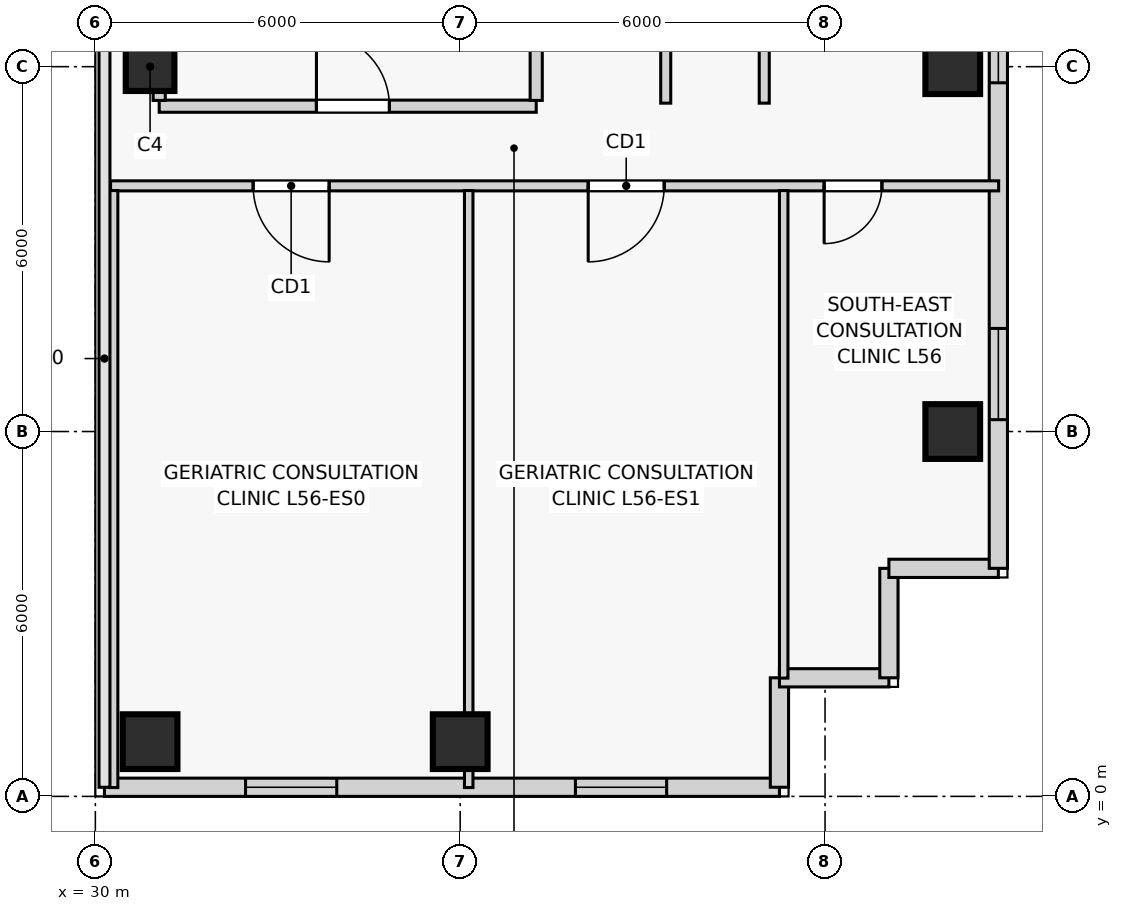
"""IFC4 building model, lengths in metres.
Left out: names, types, materials, properties, quantities, classifications, styles, units other than length and angle.
Written with IfcOpenShell. Run it as: python <this file> out.ifc"""

import sys

from ifc_helpers import new_model, si_unit, direction, frame, frame_2d, origin, origin_2d, place, context, subcontext, project, spatial, rectangle, extrude, source, transform, mapped, element, fill, save


model = new_model("IFC4")
c1 = context("Model", 3, precision=1e-05, world=origin(), true_north=direction((0.0, 1.0)))
c2 = subcontext(c1, "Body", "Model", "MODEL_VIEW")
j1 = project(units=[si_unit("LENGTHUNIT", "METRE"), si_unit("PLANEANGLEUNIT", "RADIAN")], contexts=[c1])
p1 = place(None, origin())
s1 = spatial("IfcSite", under=j1, at=p1, CompositionType="ELEMENT")
p2 = place(p1, origin())
s2 = spatial("IfcBuilding", under=s1, at=p2, CompositionType="ELEMENT")
p3 = place(p2, frame((0.0, 0.0, 213.3)))
s3 = spatial("IfcBuildingStorey", under=s2, at=p3, CompositionType="ELEMENT", Elevation=213.3)
m1 = source(origin(), c2, "Body", "SweptSolid", [
    extrude(rectangle(XDim=0.9, YDim=0.9, at=origin_2d()), origin(), (0.0, 0.0, 1.0), 3.6),
])
for number, where, z_axis, x_axis in (
    (1, (30.9, 0.9, 0.0), (0.0, 0.0, 1.0), (1.0, 0.0, 0.0)),
    (2, (36.0, 0.9, 0.0), (0.0, 0.0, 1.0), (1.0, 0.0, 0.0)),
    (3, (44.1, 6.0, 0.0), (0.0, 0.0, 1.0), (1.0, 0.0, 0.0)),
    (4, (44.1, 12.0, 0.0), (0.0, 0.0, 1.0), (1.0, 0.0, 0.0)),
):
    element("IfcColumn", number, at=place(p3, frame(where, z_axis=z_axis, x_axis=x_axis)), inside=s3, PredefinedType="COLUMN", context=c2, shape_type="MappedRepresentation", body=[
        mapped(m1, transform((0.0, 0.0, 0.0), scale=1.0)),
    ])
m2 = source(origin(), c2, "Body", "SweptSolid", [
    extrude(rectangle(XDim=0.8, YDim=0.8, at=origin_2d()), origin(), (0.0, 0.0, 1.0), 3.6),
])
p4 = place(p3, frame((30.9, 12.0, 0.0), z_axis=(0.0, 0.0, 1.0), x_axis=(1.0, 0.0, 0.0)))
e5 = element("IfcColumn", 5, at=p4, inside=s3, PredefinedType="COLUMN", context=c2, shape_type="MappedRepresentation", body=[
    mapped(m2, transform((0.0, 0.0, 0.0), scale=1.0)),
])
p5 = place(p3, frame((30.15, 0.15, 0.0), z_axis=(0.0, 0.0, 1.0), x_axis=(1.0, 0.0, 0.0)))
e6 = element("IfcWall", 6, at=p5, inside=s3, PredefinedType="SOLIDWALL", context=c2, shape_type="SweptSolid", body=[
    extrude(rectangle(XDim=11.1, YDim=0.3, at=frame_2d((5.55, 0.0))), origin(), (0.0, 0.0, 1.0), 2.95),
])
p6 = place(p5, frame((2.32, 0.0, 0.85)))
e7 = element("IfcOpeningElement", 7, at=p6, cuts=e6, PredefinedType="OPENING", context=c2, shape_type="SweptSolid", body=[
    extrude(rectangle(XDim=1.5, YDim=1.8, at=frame_2d((0.75, 0.9))), frame((0.0, 0.16, 0.0), z_axis=(0.0, -1.0, 0.0), x_axis=(1.0, 0.0, 0.0)), (0.0, 0.0, 1.0), 0.32),
])
p7 = place(p5, frame((7.745, 0.0, 0.85)))
e8 = element("IfcOpeningElement", 8, at=p7, cuts=e6, PredefinedType="OPENING", context=c2, shape_type="SweptSolid", body=[
    extrude(rectangle(XDim=1.5, YDim=1.8, at=frame_2d((0.75, 0.9))), frame((0.0, 0.16, 0.0), z_axis=(0.0, -1.0, 0.0), x_axis=(1.0, 0.0, 0.0)), (0.0, 0.0, 1.0), 0.32),
])
for number, where, z_axis, x_axis in (
    (9, (41.25, 0.15, 0.0), (0.0, 0.0, 1.0), (0.0, 1.0, 0.0)),
    (10, (41.25, 1.95, 0.0), (0.0, 0.0, 1.0), (1.0, 0.0, 0.0)),
    (11, (43.05, 1.95, 0.0), (0.0, 0.0, 1.0), (0.0, 1.0, 0.0)),
    (12, (43.05, 3.75, 0.0), (0.0, 0.0, 1.0), (1.0, 0.0, 0.0)),
):
    element("IfcWall", number, at=place(p3, frame(where, z_axis=z_axis, x_axis=x_axis)), inside=s3, PredefinedType="SOLIDWALL", context=c2, shape_type="SweptSolid", body=[
        extrude(rectangle(XDim=1.8, YDim=0.3, at=frame_2d((0.9, 0.0))), origin(), (0.0, 0.0, 1.0), 2.95),
    ])
p8 = place(p3, frame((44.85, 3.75, 0.0), z_axis=(0.0, 0.0, 1.0), x_axis=(0.0, 1.0, 0.0)))
e13 = element("IfcWall", 13, at=p8, inside=s3, PredefinedType="SOLIDWALL", context=c2, shape_type="SweptSolid", body=[
    extrude(rectangle(XDim=15.65, YDim=0.3, at=frame_2d((7.825, 0.0))), origin(), (0.0, 0.0, 1.0), 2.95),
])
p9 = place(p8, frame((2.445, 0.0, 0.85)))
e14 = element("IfcOpeningElement", 14, at=p9, cuts=e13, PredefinedType="OPENING", context=c2, shape_type="SweptSolid", body=[
    extrude(rectangle(XDim=1.5, YDim=1.8, at=frame_2d((0.75, 0.9))), frame((0.0, 0.16, 0.0), z_axis=(0.0, -1.0, 0.0), x_axis=(1.0, 0.0, 0.0)), (0.0, 0.0, 1.0), 0.32),
])
p10 = place(p8, frame((7.985, 0.0, 0.85)))
e15 = element("IfcOpeningElement", 15, at=p10, cuts=e13, PredefinedType="OPENING", context=c2, shape_type="SweptSolid", body=[
    extrude(rectangle(XDim=1.5, YDim=1.8, at=frame_2d((0.75, 0.9))), frame((0.0, 0.16, 0.0), z_axis=(0.0, -1.0, 0.0), x_axis=(1.0, 0.0, 0.0)), (0.0, 0.0, 1.0), 0.32),
])
p11 = place(p8, frame((12.355, 0.0, 0.85)))
e16 = element("IfcOpeningElement", 16, at=p11, cuts=e13, PredefinedType="OPENING", context=c2, shape_type="SweptSolid", body=[
    extrude(rectangle(XDim=1.5, YDim=1.8, at=frame_2d((0.75, 0.9))), frame((0.0, 0.16, 0.0), z_axis=(0.0, -1.0, 0.0), x_axis=(1.0, 0.0, 0.0)), (0.0, 0.0, 1.0), 0.32),
])
p12 = place(p3, frame((31.05, 11.35, 0.0), z_axis=(0.0, 0.0, 1.0), x_axis=(1.0, 0.0, 0.0)))
e17 = element("IfcWall", 17, at=p12, inside=s3, PredefinedType="PARTITIONING", context=c2, shape_type="SweptSolid", body=[
    extrude(rectangle(XDim=6.2, YDim=0.2, at=frame_2d((3.1, 0.0))), origin(), (0.0, 0.0, 1.0), 2.95),
])
p13 = place(p12, frame((2.586, 0.0, 0.0)))
e18 = element("IfcOpeningElement", 18, at=p13, cuts=e17, PredefinedType="OPENING", context=c2, shape_type="SweptSolid", body=[
    extrude(rectangle(XDim=1.2, YDim=2.2, at=frame_2d((0.6, 1.1))), frame((0.0, 0.11, 0.0), z_axis=(0.0, -1.0, 0.0), x_axis=(1.0, 0.0, 0.0)), (0.0, 0.0, 1.0), 0.22),
])
p14 = place(p3, frame((31.05, 11.445, 0.0), z_axis=(0.0, 0.0, 1.0), x_axis=(0.0, 1.0, 0.0)))
e19 = element("IfcWall", 19, at=p14, inside=s3, PredefinedType="PARTITIONING", context=c2, shape_type="SweptSolid", body=[
    extrude(rectangle(XDim=3.235, YDim=0.2, at=frame_2d((1.617, 0.0))), origin(), (0.0, 0.0, 1.0), 2.491),
])
p15 = place(p3, frame((37.25, 11.445, 0.0), z_axis=(0.0, 0.0, 1.0), x_axis=(0.0, 1.0, 0.0)))
e20 = element("IfcWall", 20, at=p15, inside=s3, PredefinedType="PARTITIONING", context=c2, shape_type="SweptSolid", body=[
    extrude(rectangle(XDim=3.235, YDim=0.2, at=frame_2d((1.617, 0.0))), origin(), (0.0, 0.0, 1.0), 2.95),
])
p16 = place(p3, frame((30.25, 10.04, 0.0), z_axis=(0.0, 0.0, 1.0), x_axis=(1.0, 0.0, 0.0)))
e21 = element("IfcWall", 21, at=p16, inside=s3, PredefinedType="PARTITIONING", context=c2, shape_type="SweptSolid", body=[
    extrude(rectangle(XDim=14.605, YDim=0.165, at=frame_2d((7.302, 0.0))), origin(), (0.0, 0.0, 1.0), 2.95),
])
p17 = place(p16, frame((2.345, 0.0, 0.0)))
e22 = element("IfcOpeningElement", 22, at=p17, cuts=e21, PredefinedType="OPENING", context=c2, shape_type="SweptSolid", body=[
    extrude(rectangle(XDim=1.25, YDim=2.2, at=frame_2d((0.625, 1.1))), frame((0.0, 0.093, 0.0), z_axis=(0.0, -1.0, 0.0), x_axis=(1.0, 0.0, 0.0)), (0.0, 0.0, 1.0), 0.185),
])
p18 = place(p16, frame((7.855, 0.0, 0.0)))
e23 = element("IfcOpeningElement", 23, at=p18, cuts=e21, PredefinedType="OPENING", context=c2, shape_type="SweptSolid", body=[
    extrude(rectangle(XDim=1.25, YDim=2.2, at=frame_2d((0.625, 1.1))), frame((0.0, 0.093, 0.0), z_axis=(0.0, -1.0, 0.0), x_axis=(1.0, 0.0, 0.0)), (0.0, 0.0, 1.0), 0.185),
])
p19 = place(p16, frame((11.735, 0.0, 0.0)))
e24 = element("IfcOpeningElement", 24, at=p19, cuts=e21, PredefinedType="OPENING", context=c2, shape_type="SweptSolid", body=[
    extrude(rectangle(XDim=0.95, YDim=2.1, at=frame_2d((0.475, 1.05))), frame((0.0, 0.093, 0.0), z_axis=(0.0, -1.0, 0.0), x_axis=(1.0, 0.0, 0.0)), (0.0, 0.0, 1.0), 0.185),
])
p20 = place(p3, frame((41.0, 11.4, 0.0), z_axis=(0.0, 0.0, 1.0), x_axis=(0.0, 1.0, 0.0)))
e25 = element("IfcWall", 25, at=p20, inside=s3, PredefinedType="PARTITIONING", context=c2, shape_type="SweptSolid", body=[
    extrude(rectangle(XDim=19.05, YDim=0.165, at=frame_2d((9.525, 0.0))), origin(), (0.0, 0.0, 1.0), 2.95),
])
p21 = place(p20, frame((3.475, 0.0, 0.0)))
e26 = element("IfcOpeningElement", 26, at=p21, cuts=e25, PredefinedType="OPENING", context=c2, shape_type="SweptSolid", body=[
    extrude(rectangle(XDim=0.95, YDim=2.1, at=frame_2d((0.475, 1.05))), frame((0.0, 0.093, 0.0), z_axis=(0.0, -1.0, 0.0), x_axis=(1.0, 0.0, 0.0)), (0.0, 0.0, 1.0), 0.185),
])
p22 = place(p20, frame((13.1, 0.0, 0.0)))
e27 = element("IfcOpeningElement", 27, at=p22, cuts=e25, PredefinedType="OPENING", context=c2, shape_type="SweptSolid", body=[
    extrude(rectangle(XDim=0.95, YDim=2.1, at=frame_2d((0.475, 1.05))), frame((0.0, 0.093, 0.0), z_axis=(0.0, -1.0, 0.0), x_axis=(1.0, 0.0, 0.0)), (0.0, 0.0, 1.0), 0.185),
])
p23 = place(p3, frame((39.38, 11.4, 0.0), z_axis=(0.0, 0.0, 1.0), x_axis=(0.0, 1.0, 0.0)))
e28 = element("IfcWall", 28, at=p23, inside=s3, PredefinedType="PARTITIONING", context=c2, shape_type="SweptSolid", body=[
    extrude(rectangle(XDim=19.05, YDim=0.165, at=frame_2d((9.525, 0.0))), origin(), (0.0, 0.0, 1.0), 2.95),
])
p24 = place(p23, frame((8.925, 0.0, 0.0)))
e29 = element("IfcOpeningElement", 29, at=p24, cuts=e28, PredefinedType="OPENING", context=c2, shape_type="SweptSolid", body=[
    extrude(rectangle(XDim=0.95, YDim=2.1, at=frame_2d((0.475, 1.05))), frame((0.0, 0.093, 0.0), z_axis=(0.0, -1.0, 0.0), x_axis=(1.0, 0.0, 0.0)), (0.0, 0.0, 1.0), 0.185),
])
p25 = place(p3, frame((30.3, 0.145, 0.0), z_axis=(0.0, 0.0, 1.0), x_axis=(0.0, 1.0, 0.0)))
e30 = element("IfcWall", 30, at=p25, inside=s3, PredefinedType="PARTITIONING", context=c2, shape_type="SweptSolid", body=[
    extrude(rectangle(XDim=9.817, YDim=0.14, at=frame_2d((4.909, 0.0))), origin(), (0.0, 0.0, 1.0), 2.95),
])
p26 = place(p3, frame((36.14, 0.145, 0.0), z_axis=(0.0, 0.0, 1.0), x_axis=(0.0, 1.0, 0.0)))
e31 = element("IfcWall", 31, at=p26, inside=s3, PredefinedType="PARTITIONING", context=c2, shape_type="SweptSolid", body=[
    extrude(rectangle(XDim=9.817, YDim=0.14, at=frame_2d((4.909, 0.0))), origin(), (0.0, 0.0, 1.0), 2.491),
])
p27 = place(p3, frame((41.32, 1.945, 0.0), z_axis=(0.0, 0.0, 1.0), x_axis=(0.0, 1.0, 0.0)))
e32 = element("IfcWall", 32, at=p27, inside=s3, PredefinedType="PARTITIONING", context=c2, shape_type="SweptSolid", body=[
    extrude(rectangle(XDim=8.017, YDim=0.14, at=frame_2d((4.009, 0.0))), origin(), (0.0, 0.0, 1.0), 2.95),
])
m3 = source(origin(), c2, "Body", "SweptSolid", [
    extrude(rectangle(XDim=1.5, YDim=1.8, at=frame_2d((0.75, 0.9))), frame((0.0, 0.03, 0.0), z_axis=(0.0, -1.0, 0.0), x_axis=(1.0, 0.0, 0.0)), (0.0, 0.0, 1.0), 0.06),
])
p28 = place(p6, origin())
e33 = element("IfcWindow", 33, at=p28, inside=s3, PartitioningType="SINGLE_PANEL", PredefinedType="WINDOW", context=c2, shape_type="MappedRepresentation", body=[
    mapped(m3, transform((0.0, 0.0, 0.0), scale=1.0)),
])
fill(e7, e33)
p29 = place(p7, origin())
e34 = element("IfcWindow", 34, at=p29, inside=s3, PartitioningType="SINGLE_PANEL", PredefinedType="WINDOW", context=c2, shape_type="MappedRepresentation", body=[
    mapped(m3, transform((0.0, 0.0, 0.0), scale=1.0)),
])
fill(e8, e34)
p30 = place(p9, origin())
e35 = element("IfcWindow", 35, at=p30, inside=s3, PartitioningType="SINGLE_PANEL", PredefinedType="WINDOW", context=c2, shape_type="MappedRepresentation", body=[
    mapped(m3, transform((0.0, 0.0, 0.0), scale=1.0)),
])
fill(e14, e35)
p31 = place(p10, origin())
e36 = element("IfcWindow", 36, at=p31, inside=s3, PartitioningType="SINGLE_PANEL", PredefinedType="WINDOW", context=c2, shape_type="MappedRepresentation", body=[
    mapped(m3, transform((0.0, 0.0, 0.0), scale=1.0)),
])
fill(e15, e36)
m4 = source(origin(), c2, "Body", "SweptSolid", [
    extrude(rectangle(XDim=1.2, YDim=2.2, at=frame_2d((0.6, 1.1))), frame((0.0, 0.025, 0.0), z_axis=(0.0, -1.0, 0.0), x_axis=(1.0, 0.0, 0.0)), (0.0, 0.0, 1.0), 0.05),
])
p32 = place(p13, origin())
e37 = element("IfcDoor", 37, at=p32, inside=s3, OperationType="SINGLE_SWING_LEFT", PredefinedType="DOOR", context=c2, shape_type="MappedRepresentation", body=[
    mapped(m4, transform((0.0, 0.0, 0.0), scale=1.0)),
])
fill(e18, e37)
m5 = source(origin(), c2, "Body", "SweptSolid", [
    extrude(rectangle(XDim=1.25, YDim=2.2, at=frame_2d((0.625, 1.1))), frame((0.0, 0.025, 0.0), z_axis=(0.0, -1.0, 0.0), x_axis=(1.0, 0.0, 0.0)), (0.0, 0.0, 1.0), 0.05),
])
p33 = place(p17, frame((1.25, 0.0, 0.0), z_axis=(0.0, 0.0, 1.0), x_axis=(-1.0, 0.0, 0.0)))
e38 = element("IfcDoor", 38, at=p33, inside=s3, OperationType="SINGLE_SWING_LEFT", PredefinedType="DOOR", context=c2, shape_type="MappedRepresentation", body=[
    mapped(m5, transform((0.0, 0.0, 0.0), scale=1.0)),
])
fill(e22, e38)
p34 = place(p18, frame((1.25, 0.0, 0.0), z_axis=(0.0, 0.0, 1.0), x_axis=(-1.0, 0.0, 0.0)))
e39 = element("IfcDoor", 39, at=p34, inside=s3, OperationType="SINGLE_SWING_RIGHT", PredefinedType="DOOR", context=c2, shape_type="MappedRepresentation", body=[
    mapped(m5, transform((0.0, 0.0, 0.0), scale=1.0)),
])
fill(e23, e39)
m6 = source(origin(), c2, "Body", "SweptSolid", [
    extrude(rectangle(XDim=0.95, YDim=2.1, at=frame_2d((0.475, 1.05))), frame((0.0, 0.025, 0.0), z_axis=(0.0, -1.0, 0.0), x_axis=(1.0, 0.0, 0.0)), (0.0, 0.0, 1.0), 0.05),
])
p35 = place(p19, frame((0.95, 0.0, 0.0), z_axis=(0.0, 0.0, 1.0), x_axis=(-1.0, 0.0, 0.0)))
e40 = element("IfcDoor", 40, at=p35, inside=s3, OperationType="SINGLE_SWING_RIGHT", PredefinedType="DOOR", context=c2, shape_type="MappedRepresentation", body=[
    mapped(m6, transform((0.0, 0.0, 0.0), scale=1.0)),
])
fill(e24, e40)
save(model, sys.argv[1])
